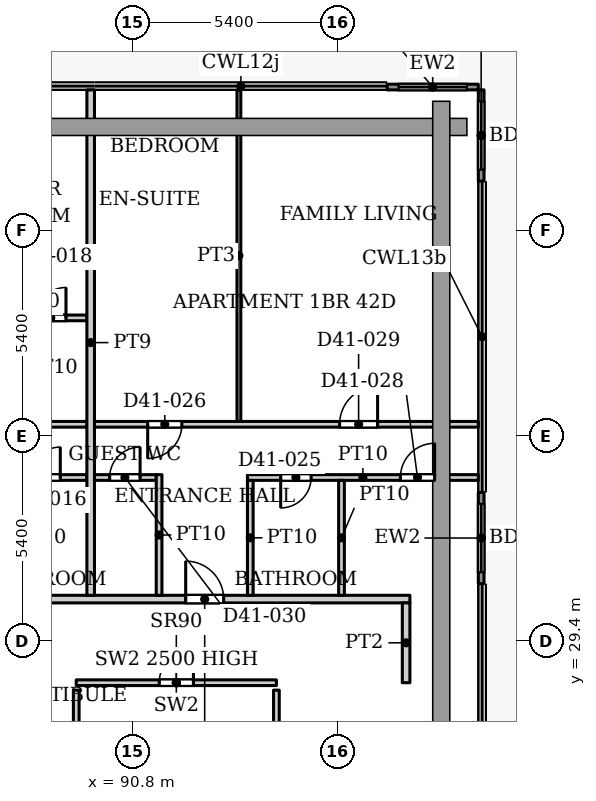
"""IFC4 building model, lengths in metres.
Left out: names, types, materials, properties, quantities, classifications, styles, units other than length and angle.
Written with IfcOpenShell. Run it as: python <this file> out.ifc"""

import sys

from ifc_helpers import new_model, si_unit, direction, frame, frame_2d, origin, place, context, subcontext, project, spatial, rectangle, extrude, source, transform, mapped, element, fill, save


model = new_model("IFC4")
c1 = context("Model", 3, precision=1e-05, world=origin(), true_north=direction((0.0, 1.0)))
c2 = subcontext(c1, "Body", "Model", "MODEL_VIEW")
j1 = project(units=[si_unit("LENGTHUNIT", "METRE"), si_unit("PLANEANGLEUNIT", "RADIAN")], contexts=[c1])
p1 = place(None, origin())
s1 = spatial("IfcSite", under=j1, at=p1, CompositionType="ELEMENT")
p2 = place(p1, origin())
s2 = spatial("IfcBuilding", under=s1, at=p2, CompositionType="ELEMENT")
p3 = place(p2, frame((0.0, 0.0, 179.9)))
s3 = spatial("IfcBuildingStorey", under=s2, at=p3, CompositionType="ELEMENT", Elevation=179.9)
p4 = place(p3, frame((97.5, 43.975, 0.0), z_axis=(0.0, 0.0, 1.0), x_axis=(1.0, 0.0, 0.0)))
e1 = element("IfcWall", 1, at=p4, inside=s3, PredefinedType="SOLIDWALL", context=c2, shape_type="SweptSolid", body=[
    extrude(rectangle(XDim=2.4, YDim=0.15, at=frame_2d((1.2, 0.0))), origin(), (0.0, 0.0, 1.0), 3.75),
])
p5 = place(p4, frame((0.3, 0.0, 0.0)))
e2 = element("IfcOpeningElement", 2, at=p5, cuts=e1, PredefinedType="OPENING", context=c2, shape_type="SweptSolid", body=[
    extrude(rectangle(XDim=1.8, YDim=2.4, at=frame_2d((0.9, 1.2))), frame((0.0, 0.085, 0.0), z_axis=(0.0, -1.0, 0.0), x_axis=(1.0, 0.0, 0.0)), (0.0, 0.0, 1.0), 0.17),
])
p6 = place(p3, frame((99.975, 43.9, 0.0), z_axis=(0.0, 0.0, 1.0), x_axis=(0.0, -1.0, 0.0)))
e3 = element("IfcWall", 3, at=p6, inside=s3, PredefinedType="SOLIDWALL", context=c2, shape_type="SweptSolid", body=[
    extrude(rectangle(XDim=2.4, YDim=0.15, at=frame_2d((1.2, 0.0))), origin(), (0.0, 0.0, 1.0), 3.75),
])
p7 = place(p6, frame((0.3, 0.0, 0.0)))
e4 = element("IfcOpeningElement", 4, at=p7, cuts=e3, PredefinedType="OPENING", context=c2, shape_type="SweptSolid", body=[
    extrude(rectangle(XDim=1.8, YDim=2.4, at=frame_2d((0.9, 1.2))), frame((0.0, 0.085, 0.0), z_axis=(0.0, -1.0, 0.0), x_axis=(1.0, 0.0, 0.0)), (0.0, 0.0, 1.0), 0.17),
])
p8 = place(p3, frame((99.975, 33.307, 0.0), z_axis=(0.0, 0.0, 1.0), x_axis=(0.0, -1.0, 0.0)))
e5 = element("IfcWall", 5, at=p8, inside=s3, PredefinedType="SOLIDWALL", context=c2, shape_type="SweptSolid", body=[
    extrude(rectangle(XDim=2.4, YDim=0.15, at=frame_2d((1.2, 0.0))), origin(), (0.0, 0.0, 1.0), 3.75),
])
p9 = place(p8, frame((0.3, 0.0, 0.0)))
e6 = element("IfcOpeningElement", 6, at=p9, cuts=e5, PredefinedType="OPENING", context=c2, shape_type="SweptSolid", body=[
    extrude(rectangle(XDim=1.8, YDim=2.4, at=frame_2d((0.9, 1.2))), frame((0.0, 0.085, 0.0), z_axis=(0.0, -1.0, 0.0), x_axis=(1.0, 0.0, 0.0)), (0.0, 0.0, 1.0), 0.17),
])
p10 = place(p3, frame((89.32, 28.3, 0.0), z_axis=(0.0, 0.0, 1.0), x_axis=(1.0, 0.0, 0.0)))
e7 = element("IfcWall", 7, at=p10, inside=s3, PredefinedType="PARTITIONING", context=c2, shape_type="SweptSolid", body=[
    extrude(rectangle(XDim=5.267, YDim=0.15, at=frame_2d((2.633, 0.0))), origin(), (0.0, 0.0, 1.0), 2.5),
])
p11 = place(p10, frame((2.184, 0.0, 0.0)))
e8 = element("IfcOpeningElement", 8, at=p11, cuts=e7, PredefinedType="OPENING", context=c2, shape_type="SweptSolid", body=[
    extrude(rectangle(XDim=0.9, YDim=2.2, at=frame_2d((0.45, 1.1))), frame((0.0, 0.085, 0.0), z_axis=(0.0, -1.0, 0.0), x_axis=(1.0, 0.0, 0.0)), (0.0, 0.0, 1.0), 0.17),
])
p12 = place(p3, frame((89.32, 25.62, 0.0), z_axis=(0.0, 0.0, 1.0), x_axis=(0.0, 1.0, 0.0)))
e9 = element("IfcWall", 9, at=p12, inside=s3, PredefinedType="PARTITIONING", context=c2, shape_type="SweptSolid", body=[
    extrude(rectangle(XDim=2.485, YDim=0.15, at=frame_2d((1.242, 0.0))), origin(), (0.0, 0.0, 1.0), 3.9),
])
p13 = place(p3, frame((94.587, 21.293, 0.0), z_axis=(0.0, 0.0, 1.0), x_axis=(0.0, 1.0, 0.0)))
e10 = element("IfcWall", 10, at=p13, inside=s3, PredefinedType="PARTITIONING", context=c2, shape_type="SweptSolid", body=[
    extrude(rectangle(XDim=6.812, YDim=0.15, at=frame_2d((3.406, 0.0))), origin(), (0.0, 0.0, 1.0), 3.9),
])
p14 = place(p3, frame((53.549, 30.5, 0.0), z_axis=(0.0, 0.0, 1.0), x_axis=(1.0, 0.0, 0.0)))
e11 = element("IfcWall", 11, at=p14, inside=s3, PredefinedType="PARTITIONING", context=c2, shape_type="SweptSolid", body=[
    extrude(rectangle(XDim=44.551, YDim=0.2, at=frame_2d((22.275, 0.0))), origin(), (0.0, 0.0, 1.0), 3.6),
])
p15 = place(p14, frame((6.851, 0.0, 0.0)))
e12 = element("IfcOpeningElement", 12, at=p15, cuts=e11, PredefinedType="OPENING", context=c2, shape_type="SweptSolid", body=[
    extrude(rectangle(XDim=1.0, YDim=2.1, at=frame_2d((0.5, 1.05))), frame((0.0, 0.11, 0.0), z_axis=(0.0, -1.0, 0.0), x_axis=(1.0, 0.0, 0.0)), (0.0, 0.0, 1.0), 0.22),
])
p16 = place(p14, frame((13.451, 0.0, 0.0)))
e13 = element("IfcOpeningElement", 13, at=p16, cuts=e11, PredefinedType="OPENING", context=c2, shape_type="SweptSolid", body=[
    extrude(rectangle(XDim=1.0, YDim=2.1, at=frame_2d((0.5, 1.05))), frame((0.0, 0.11, 0.0), z_axis=(0.0, -1.0, 0.0), x_axis=(1.0, 0.0, 0.0)), (0.0, 0.0, 1.0), 0.22),
])
p17 = place(p14, frame((24.701, 0.0, 0.0)))
e14 = element("IfcOpeningElement", 14, at=p17, cuts=e11, PredefinedType="OPENING", context=c2, shape_type="SweptSolid", body=[
    extrude(rectangle(XDim=1.0, YDim=2.1, at=frame_2d((0.5, 1.05))), frame((0.0, 0.11, 0.0), z_axis=(0.0, -1.0, 0.0), x_axis=(1.0, 0.0, 0.0)), (0.0, 0.0, 1.0), 0.22),
])
p18 = place(p14, frame((38.651, 0.0, 0.0)))
e15 = element("IfcOpeningElement", 15, at=p18, cuts=e11, PredefinedType="OPENING", context=c2, shape_type="SweptSolid", body=[
    extrude(rectangle(XDim=1.0, YDim=2.1, at=frame_2d((0.5, 1.05))), frame((0.0, 0.11, 0.0), z_axis=(0.0, -1.0, 0.0), x_axis=(1.0, 0.0, 0.0)), (0.0, 0.0, 1.0), 0.22),
])
p19 = place(p3, frame((77.8, 35.1, 0.0), z_axis=(0.0, 0.0, 1.0), x_axis=(1.0, 0.0, 0.0)))
e16 = element("IfcWall", 16, at=p19, inside=s3, PredefinedType="PARTITIONING", context=c2, shape_type="SweptSolid", body=[
    extrude(rectangle(XDim=11.8, YDim=0.15, at=frame_2d((5.9, 0.0))), origin(), (0.0, 0.0, 1.0), 3.6),
])
p20 = place(p19, frame((5.6, 0.0, 0.0)))
e17 = element("IfcOpeningElement", 17, at=p20, cuts=e16, PredefinedType="OPENING", context=c2, shape_type="SweptSolid", body=[
    extrude(rectangle(XDim=0.9, YDim=2.1, at=frame_2d((0.45, 1.05))), frame((0.0, 0.085, 0.0), z_axis=(0.0, -1.0, 0.0), x_axis=(1.0, 0.0, 0.0)), (0.0, 0.0, 1.0), 0.17),
])
p21 = place(p19, frame((1.5, 0.0, 0.0)))
e18 = element("IfcOpeningElement", 18, at=p21, cuts=e16, PredefinedType="OPENING", context=c2, shape_type="SweptSolid", body=[
    extrude(rectangle(XDim=1.0, YDim=2.1, at=frame_2d((0.5, 1.05))), frame((0.0, 0.085, 0.0), z_axis=(0.0, -1.0, 0.0), x_axis=(1.0, 0.0, 0.0)), (0.0, 0.0, 1.0), 0.17),
])
p22 = place(p19, frame((8.45, 0.0, 0.0)))
e19 = element("IfcOpeningElement", 19, at=p22, cuts=e16, PredefinedType="OPENING", context=c2, shape_type="SweptSolid", body=[
    extrude(rectangle(XDim=0.9, YDim=2.1, at=frame_2d((0.45, 1.05))), frame((0.0, 0.085, 0.0), z_axis=(0.0, -1.0, 0.0), x_axis=(1.0, 0.0, 0.0)), (0.0, 0.0, 1.0), 0.17),
])
p23 = place(p3, frame((79.725, 33.7, 0.0), z_axis=(0.0, 0.0, 1.0), x_axis=(1.0, 0.0, 0.0)))
e20 = element("IfcWall", 20, at=p23, inside=s3, PredefinedType="PARTITIONING", context=c2, shape_type="SweptSolid", body=[
    extrude(rectangle(XDim=9.875, YDim=0.15, at=frame_2d((4.938, 0.0))), origin(), (0.0, 0.0, 1.0), 3.6),
])
p24 = place(p23, frame((8.375, 0.0, 0.0)))
e21 = element("IfcOpeningElement", 21, at=p24, cuts=e20, PredefinedType="OPENING", context=c2, shape_type="SweptSolid", body=[
    extrude(rectangle(XDim=0.8, YDim=2.1, at=frame_2d((0.4, 1.05))), frame((0.0, 0.085, 0.0), z_axis=(0.0, -1.0, 0.0), x_axis=(1.0, 0.0, 0.0)), (0.0, 0.0, 1.0), 0.17),
])
p25 = place(p23, frame((5.325, 0.0, 0.0)))
e22 = element("IfcOpeningElement", 22, at=p25, cuts=e20, PredefinedType="OPENING", context=c2, shape_type="SweptSolid", body=[
    extrude(rectangle(XDim=0.9, YDim=2.1, at=frame_2d((0.45, 1.05))), frame((0.0, 0.085, 0.0), z_axis=(0.0, -1.0, 0.0), x_axis=(1.0, 0.0, 0.0)), (0.0, 0.0, 1.0), 0.17),
])
p26 = place(p23, frame((0.725, 0.0, 0.0)))
e23 = element("IfcOpeningElement", 23, at=p26, cuts=e20, PredefinedType="OPENING", context=c2, shape_type="SweptSolid", body=[
    extrude(rectangle(XDim=0.8, YDim=2.1, at=frame_2d((0.4, 1.05))), frame((0.0, 0.085, 0.0), z_axis=(0.0, -1.0, 0.0), x_axis=(1.0, 0.0, 0.0)), (0.0, 0.0, 1.0), 0.17),
])
p27 = place(p23, frame((2.675, 0.0, 0.0)))
e24 = element("IfcOpeningElement", 24, at=p27, cuts=e20, PredefinedType="OPENING", context=c2, shape_type="SweptSolid", body=[
    extrude(rectangle(XDim=0.8, YDim=2.1, at=frame_2d((0.4, 1.05))), frame((0.0, 0.085, 0.0), z_axis=(0.0, -1.0, 0.0), x_axis=(1.0, 0.0, 0.0)), (0.0, 0.0, 1.0), 0.17),
])
p28 = place(p3, frame((87.675, 37.9, 0.0), z_axis=(0.0, 0.0, 1.0), x_axis=(1.0, 0.0, 0.0)))
e25 = element("IfcWall", 25, at=p28, inside=s3, PredefinedType="PARTITIONING", context=c2, shape_type="SweptSolid", body=[
    extrude(rectangle(XDim=1.925, YDim=0.15, at=frame_2d((0.962, 0.0))), origin(), (0.0, 0.0, 1.0), 3.6),
])
p29 = place(p28, frame((0.575, 0.0, 0.0)))
e26 = element("IfcOpeningElement", 26, at=p29, cuts=e25, PredefinedType="OPENING", context=c2, shape_type="SweptSolid", body=[
    extrude(rectangle(XDim=0.8, YDim=2.1, at=frame_2d((0.4, 1.05))), frame((0.0, 0.085, 0.0), z_axis=(0.0, -1.0, 0.0), x_axis=(1.0, 0.0, 0.0)), (0.0, 0.0, 1.0), 0.17),
])
p30 = place(p3, frame((89.7, 30.6, 0.0), z_axis=(0.0, 0.0, 1.0), x_axis=(0.0, 1.0, 0.0)))
e27 = element("IfcWall", 27, at=p30, inside=s3, PredefinedType="PARTITIONING", context=c2, shape_type="SweptSolid", body=[
    extrude(rectangle(XDim=13.3, YDim=0.2, at=frame_2d((6.65, 0.0))), origin(), (0.0, 0.0, 1.0), 3.6),
])
p31 = place(p3, frame((89.8, 33.7, 0.0), z_axis=(0.0, 0.0, 1.0), x_axis=(1.0, 0.0, 0.0)))
e28 = element("IfcWall", 28, at=p31, inside=s3, PredefinedType="PARTITIONING", context=c2, shape_type="SweptSolid", body=[
    extrude(rectangle(XDim=1.625, YDim=0.15, at=frame_2d((0.812, 0.0))), origin(), (0.0, 0.0, 1.0), 3.6),
])
p32 = place(p31, frame((0.4, 0.0, 0.0)))
e29 = element("IfcOpeningElement", 29, at=p32, cuts=e28, PredefinedType="OPENING", context=c2, shape_type="SweptSolid", body=[
    extrude(rectangle(XDim=0.8, YDim=2.1, at=frame_2d((0.4, 1.05))), frame((0.0, 0.085, 0.0), z_axis=(0.0, -1.0, 0.0), x_axis=(1.0, 0.0, 0.0)), (0.0, 0.0, 1.0), 0.17),
])
p33 = place(p3, frame((89.8, 35.1, 0.0), z_axis=(0.0, 0.0, 1.0), x_axis=(1.0, 0.0, 0.0)))
e30 = element("IfcWall", 30, at=p33, inside=s3, PredefinedType="PARTITIONING", context=c2, shape_type="SweptSolid", body=[
    extrude(rectangle(XDim=10.1, YDim=0.15, at=frame_2d((5.05, 0.0))), origin(), (0.0, 0.0, 1.0), 3.6),
])
p34 = place(p33, frame((1.4, 0.0, 0.0)))
e31 = element("IfcOpeningElement", 31, at=p34, cuts=e30, PredefinedType="OPENING", context=c2, shape_type="SweptSolid", body=[
    extrude(rectangle(XDim=0.9, YDim=2.1, at=frame_2d((0.45, 1.05))), frame((0.0, 0.085, 0.0), z_axis=(0.0, -1.0, 0.0), x_axis=(1.0, 0.0, 0.0)), (0.0, 0.0, 1.0), 0.17),
])
p35 = place(p33, frame((6.45, 0.0, 0.0)))
e32 = element("IfcOpeningElement", 32, at=p35, cuts=e30, PredefinedType="OPENING", context=c2, shape_type="SweptSolid", body=[
    extrude(rectangle(XDim=1.0, YDim=2.1, at=frame_2d((0.5, 1.05))), frame((0.0, 0.085, 0.0), z_axis=(0.0, -1.0, 0.0), x_axis=(1.0, 0.0, 0.0)), (0.0, 0.0, 1.0), 0.17),
])
p36 = place(p3, frame((91.5, 30.6, 0.0), z_axis=(0.0, 0.0, 1.0), x_axis=(0.0, 1.0, 0.0)))
e33 = element("IfcWall", 33, at=p36, inside=s3, PredefinedType="PARTITIONING", context=c2, shape_type="SweptSolid", body=[
    extrude(rectangle(XDim=3.175, YDim=0.15, at=frame_2d((1.587, 0.0))), origin(), (0.0, 0.0, 1.0), 3.6),
])
p37 = place(p3, frame((93.6, 35.175, 0.0), z_axis=(0.0, 0.0, 1.0), x_axis=(0.0, 1.0, 0.0)))
e34 = element("IfcWall", 34, at=p37, inside=s3, PredefinedType="PARTITIONING", context=c2, shape_type="SweptSolid", body=[
    extrude(rectangle(XDim=8.725, YDim=0.1, at=frame_2d((4.362, 0.0))), origin(), (0.0, 0.0, 1.0), 3.6),
])
p38 = place(p3, frame((93.825, 33.7, 0.0), z_axis=(0.0, 0.0, 1.0), x_axis=(1.0, 0.0, 0.0)))
e35 = element("IfcWall", 35, at=p38, inside=s3, PredefinedType="PARTITIONING", context=c2, shape_type="SweptSolid", body=[
    extrude(rectangle(XDim=6.075, YDim=0.15, at=frame_2d((3.038, 0.0))), origin(), (0.0, 0.0, 1.0), 3.6),
])
p39 = place(p38, frame((0.875, 0.0, 0.0)))
e36 = element("IfcOpeningElement", 36, at=p39, cuts=e35, PredefinedType="OPENING", context=c2, shape_type="SweptSolid", body=[
    extrude(rectangle(XDim=0.8, YDim=2.1, at=frame_2d((0.4, 1.05))), frame((0.0, 0.085, 0.0), z_axis=(0.0, -1.0, 0.0), x_axis=(1.0, 0.0, 0.0)), (0.0, 0.0, 1.0), 0.17),
])
p40 = place(p38, frame((4.025, 0.0, 0.0)))
e37 = element("IfcOpeningElement", 37, at=p40, cuts=e35, PredefinedType="OPENING", context=c2, shape_type="SweptSolid", body=[
    extrude(rectangle(XDim=0.9, YDim=2.1, at=frame_2d((0.45, 1.05))), frame((0.0, 0.085, 0.0), z_axis=(0.0, -1.0, 0.0), x_axis=(1.0, 0.0, 0.0)), (0.0, 0.0, 1.0), 0.17),
])
for number, where, z_axis, x_axis in (
    (38, (93.9, 30.6, 0.0), (0.0, 0.0, 1.0), (0.0, 1.0, 0.0)),
    (39, (96.3, 30.6, 0.0), (0.0, 0.0, 1.0), (0.0, 1.0, 0.0)),
):
    element("IfcWall", number, at=place(p3, frame(where, z_axis=z_axis, x_axis=x_axis)), inside=s3, PredefinedType="PARTITIONING", context=c2, shape_type="SweptSolid", body=[
        extrude(rectangle(XDim=3.025, YDim=0.15, at=frame_2d((1.512, 0.0))), origin(), (0.0, 0.0, 1.0), 3.6),
    ])
p41 = place(p3, frame((98.0, 28.3, 0.0), z_axis=(0.0, 0.0, 1.0), x_axis=(0.0, 1.0, 0.0)))
e40 = element("IfcWall", 40, at=p41, inside=s3, PredefinedType="PARTITIONING", context=c2, shape_type="SweptSolid", body=[
    extrude(rectangle(XDim=2.1, YDim=0.2, at=frame_2d((1.05, 0.0))), origin(), (0.0, 0.0, 1.0), 3.6),
])
m1 = source(origin(), c2, "Body", "SweptSolid", [
    extrude(rectangle(XDim=1.8, YDim=2.4, at=frame_2d((0.9, 1.2))), frame((0.0, 0.025, 0.0), z_axis=(0.0, -1.0, 0.0), x_axis=(1.0, 0.0, 0.0)), (0.0, 0.0, 1.0), 0.05),
])
p42 = place(p5, origin())
e41 = element("IfcDoor", 41, at=p42, inside=s3, OperationType="SLIDING_TO_LEFT", PredefinedType="DOOR", context=c2, shape_type="MappedRepresentation", body=[
    mapped(m1, transform((0.0, 0.0, 0.0), x_axis=(1.0, 0.0, 0.0), y_axis=(0.0, 1.0, 0.0), z_axis=(0.0, 0.0, 1.0), scale=1.0)),
])
fill(e2, e41)
p43 = place(p7, origin())
e42 = element("IfcDoor", 42, at=p43, inside=s3, OperationType="SLIDING_TO_LEFT", PredefinedType="DOOR", context=c2, shape_type="MappedRepresentation", body=[
    mapped(m1, transform((0.0, 0.0, 0.0), x_axis=(1.0, 0.0, 0.0), y_axis=(0.0, 1.0, 0.0), z_axis=(0.0, 0.0, 1.0), scale=1.0)),
])
fill(e4, e42)
p44 = place(p9, origin())
e43 = element("IfcDoor", 43, at=p44, inside=s3, OperationType="SLIDING_TO_LEFT", PredefinedType="DOOR", context=c2, shape_type="MappedRepresentation", body=[
    mapped(m1, transform((0.0, 0.0, 0.0), x_axis=(1.0, 0.0, 0.0), y_axis=(0.0, 1.0, 0.0), z_axis=(0.0, 0.0, 1.0), scale=1.0)),
])
fill(e6, e43)
m2 = source(origin(), c2, "Body", "SweptSolid", [
    extrude(rectangle(XDim=0.9, YDim=2.2, at=frame_2d((0.45, 1.1))), frame((0.0, 0.025, 0.0), z_axis=(0.0, -1.0, 0.0), x_axis=(1.0, 0.0, 0.0)), (0.0, 0.0, 1.0), 0.05),
])
p45 = place(p11, origin())
e44 = element("IfcDoor", 44, at=p45, inside=s3, OperationType="SINGLE_SWING_LEFT", PredefinedType="DOOR", context=c2, shape_type="MappedRepresentation", body=[
    mapped(m2, transform((0.0, 0.0, 0.0), x_axis=(1.0, 0.0, 0.0), y_axis=(0.0, 1.0, 0.0), z_axis=(0.0, 0.0, 1.0), scale=1.0)),
])
fill(e8, e44)
m3 = source(origin(), c2, "Body", "SweptSolid", [
    extrude(rectangle(XDim=0.8, YDim=2.1, at=frame_2d((0.4, 1.05))), frame((0.0, 0.025, 0.0), z_axis=(0.0, -1.0, 0.0), x_axis=(1.0, 0.0, 0.0)), (0.0, 0.0, 1.0), 0.05),
])
p46 = place(p24, origin())
e45 = element("IfcDoor", 45, at=p46, inside=s3, OperationType="SINGLE_SWING_LEFT", PredefinedType="DOOR", context=c2, shape_type="MappedRepresentation", body=[
    mapped(m3, transform((0.0, 0.0, 0.0), x_axis=(1.0, 0.0, 0.0), y_axis=(0.0, 1.0, 0.0), z_axis=(0.0, 0.0, 1.0), scale=1.0)),
])
fill(e21, e45)
p47 = place(p29, origin())
e46 = element("IfcDoor", 46, at=p47, inside=s3, OperationType="SINGLE_SWING_LEFT", PredefinedType="DOOR", context=c2, shape_type="MappedRepresentation", body=[
    mapped(m3, transform((0.0, 0.0, 0.0), x_axis=(1.0, 0.0, 0.0), y_axis=(0.0, 1.0, 0.0), z_axis=(0.0, 0.0, 1.0), scale=1.0)),
])
fill(e26, e46)
p48 = place(p39, origin())
e47 = element("IfcDoor", 47, at=p48, inside=s3, OperationType="SINGLE_SWING_RIGHT", PredefinedType="DOOR", context=c2, shape_type="MappedRepresentation", body=[
    mapped(m3, transform((0.0, 0.0, 0.0), x_axis=(1.0, 0.0, 0.0), y_axis=(0.0, 1.0, 0.0), z_axis=(0.0, 0.0, 1.0), scale=1.0)),
])
fill(e36, e47)
m4 = source(origin(), c2, "Body", "SweptSolid", [
    extrude(rectangle(XDim=0.9, YDim=2.1, at=frame_2d((0.45, 1.05))), frame((0.0, 0.025, 0.0), z_axis=(0.0, -1.0, 0.0), x_axis=(1.0, 0.0, 0.0)), (0.0, 0.0, 1.0), 0.05),
])
p49 = place(p34, origin())
e48 = element("IfcDoor", 48, at=p49, inside=s3, OperationType="SINGLE_SWING_RIGHT", PredefinedType="DOOR", context=c2, shape_type="MappedRepresentation", body=[
    mapped(m4, transform((0.0, 0.0, 0.0), x_axis=(1.0, 0.0, 0.0), y_axis=(0.0, 1.0, 0.0), z_axis=(0.0, 0.0, 1.0), scale=1.0)),
])
fill(e31, e48)
m5 = source(origin(), c2, "Body", "SweptSolid", [
    extrude(rectangle(XDim=1.0, YDim=2.1, at=frame_2d((0.5, 1.05))), frame((0.0, 0.025, 0.0), z_axis=(0.0, -1.0, 0.0), x_axis=(1.0, 0.0, 0.0)), (0.0, 0.0, 1.0), 0.05),
])
p50 = place(p18, origin())
e49 = element("IfcDoor", 49, at=p50, inside=s3, OperationType="SINGLE_SWING_LEFT", PredefinedType="DOOR", context=c2, shape_type="MappedRepresentation", body=[
    mapped(m5, transform((0.0, 0.0, 0.0), x_axis=(1.0, 0.0, 0.0), y_axis=(0.0, 1.0, 0.0), z_axis=(0.0, 0.0, 1.0), scale=1.0)),
])
fill(e15, e49)
p51 = place(p40, origin())
e50 = element("IfcDoor", 50, at=p51, inside=s3, OperationType="SINGLE_SWING_LEFT", PredefinedType="DOOR", context=c2, shape_type="MappedRepresentation", body=[
    mapped(m4, transform((0.0, 0.0, 0.0), x_axis=(1.0, 0.0, 0.0), y_axis=(0.0, 1.0, 0.0), z_axis=(0.0, 0.0, 1.0), scale=1.0)),
])
fill(e37, e50)
m6 = source(origin(), c2, "Body", "SweptSolid", [
    extrude(rectangle(XDim=1.0, YDim=2.1, at=frame_2d((0.5, 1.05))), frame((0.0, 0.025, 0.0), z_axis=(0.0, -1.0, 0.0), x_axis=(1.0, 0.0, 0.0)), (0.0, 0.0, 1.0), 0.05),
])
p52 = place(p35, origin())
e51 = element("IfcDoor", 51, at=p52, inside=s3, OperationType="SINGLE_SWING_LEFT", PredefinedType="DOOR", context=c2, shape_type="MappedRepresentation", body=[
    mapped(m6, transform((0.0, 0.0, 0.0), x_axis=(1.0, 0.0, 0.0), y_axis=(0.0, 1.0, 0.0), z_axis=(0.0, 0.0, 1.0), scale=1.0)),
])
fill(e32, e51)
p53 = place(p32, origin())
e52 = element("IfcDoor", 52, at=p53, inside=s3, OperationType="SINGLE_SWING_LEFT", PredefinedType="DOOR", context=c2, shape_type="MappedRepresentation", body=[
    mapped(m3, transform((0.0, 0.0, 0.0), x_axis=(1.0, 0.0, 0.0), y_axis=(0.0, 1.0, 0.0), z_axis=(0.0, 0.0, 1.0), scale=1.0)),
])
fill(e29, e52)
save(model, sys.argv[1])
